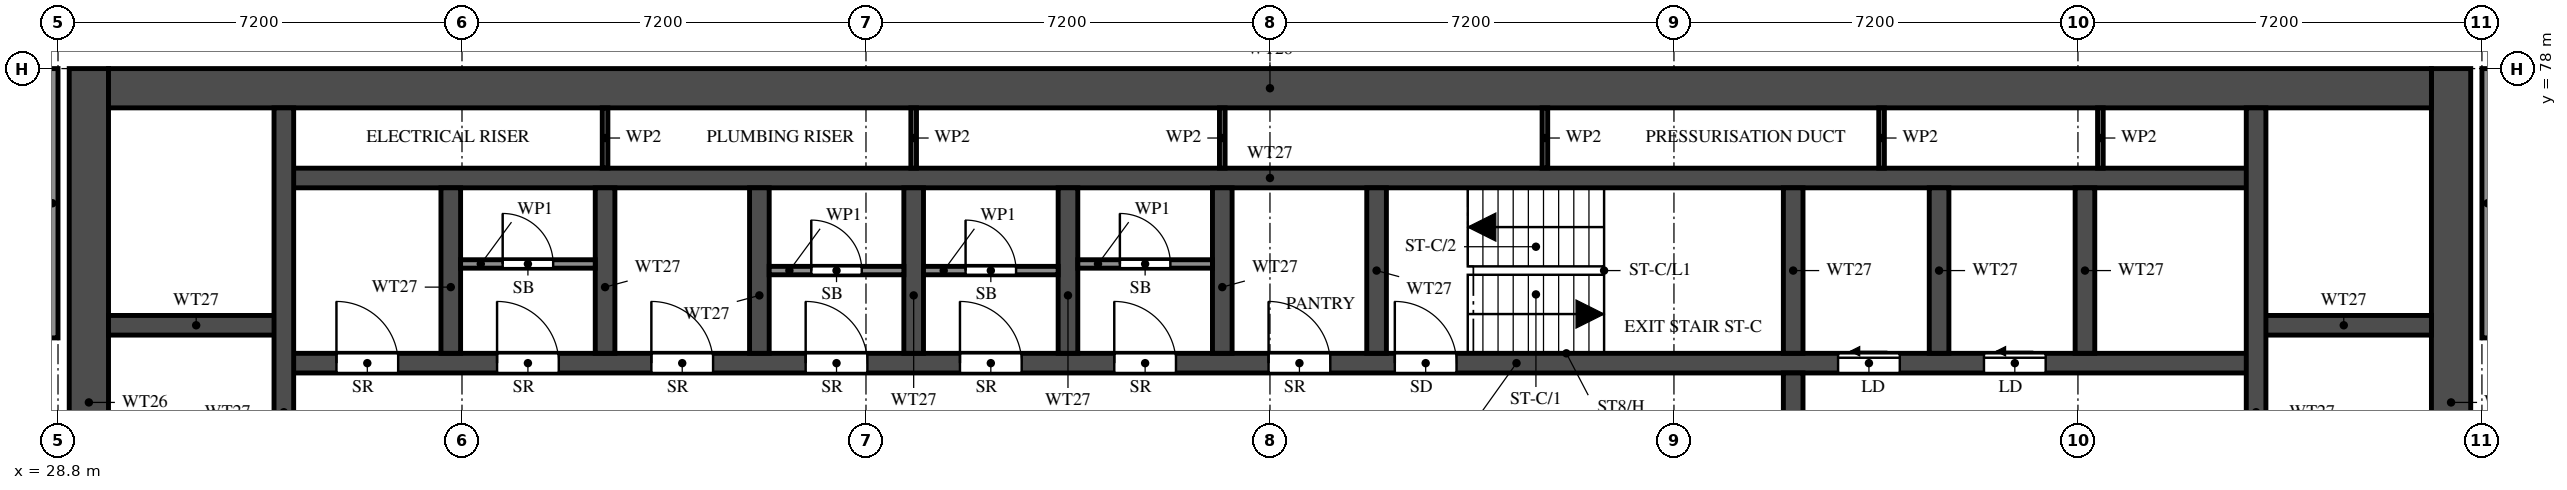
"""IFC4 building model, lengths in metres.
Left out: names, types, materials, properties, quantities, classifications, styles, units other than length and angle.
Written with IfcOpenShell. Run it as: python <this file> out.ifc"""

import sys

from ifc_helpers import new_model, si_unit, direction, frame, frame_2d, origin, place, context, subcontext, project, spatial, rectangle, extrude, element, fill, save


model = new_model("IFC4")
c1 = context("Model", 3, precision=1e-05, world=origin(), true_north=direction((0.0, 1.0)))
c2 = subcontext(c1, "Body", "Model", "MODEL_VIEW")
j1 = project(units=[si_unit("LENGTHUNIT", "METRE"), si_unit("PLANEANGLEUNIT", "RADIAN")], contexts=[c1])
p1 = place(None, origin())
s1 = spatial("IfcSite", under=j1, at=p1, CompositionType="ELEMENT")
p2 = place(p1, origin())
s2 = spatial("IfcBuilding", under=s1, at=p2, CompositionType="ELEMENT")
p3 = place(p2, frame((0.0, 0.0, 116.5)))
s3 = spatial("IfcBuildingStorey", under=s2, at=p3, CompositionType="ELEMENT", Elevation=116.5)
for number, where, z_axis, x_axis in (
    (1, (29.35, 66.1, 0.0), (0.0, 0.0, 1.0), (0.0, 1.0, 0.0)),
    (2, (71.45, 66.1, 0.0), (0.0, 0.0, 1.0), (0.0, 1.0, 0.0)),
):
    element("IfcWall", number, at=place(p3, frame(where, z_axis=z_axis, x_axis=x_axis)), inside=s3, PredefinedType="SHEAR", context=c2, shape_type="SweptSolid", body=[
        extrude(rectangle(XDim=11.9, YDim=0.7, at=frame_2d((5.95, 0.0))), origin(), (0.0, 0.0, 1.0), 3.2),
    ])
p4 = place(p3, frame((29.7, 77.65, 0.0), z_axis=(0.0, 0.0, 1.0), x_axis=(1.0, 0.0, 0.0)))
e3 = element("IfcWall", 3, at=p4, inside=s3, PredefinedType="SHEAR", context=c2, shape_type="SweptSolid", body=[
    extrude(rectangle(XDim=41.4, YDim=0.7, at=frame_2d((20.7, 0.0))), origin(), (0.0, 0.0, 1.0), 3.2),
])
p5 = place(p3, frame((32.825, 72.75, 0.0), z_axis=(0.0, 0.0, 1.0), x_axis=(1.0, 0.0, 0.0)))
e4 = element("IfcWall", 4, at=p5, inside=s3, PredefinedType="SHEAR", context=c2, shape_type="SweptSolid", body=[
    extrude(rectangle(XDim=35.15, YDim=0.35, at=frame_2d((17.575, 0.0))), origin(), (0.0, 0.0, 1.0), 3.2),
])
p6 = place(p5, frame((19.8, 0.0, 0.0)))
e5 = element("IfcOpeningElement", 5, at=p6, cuts=e4, PredefinedType="OPENING", context=c2, shape_type="SweptSolid", body=[
    extrude(rectangle(XDim=1.1, YDim=2.1, at=frame_2d((0.55, 1.05))), frame((0.0, 0.185, 0.0), z_axis=(0.0, -1.0, 0.0), x_axis=(1.0, 0.0, 0.0)), (0.0, 0.0, 1.0), 0.37),
])
p7 = place(p5, frame((27.7, 0.0, 0.0)))
e6 = element("IfcOpeningElement", 6, at=p7, cuts=e4, PredefinedType="OPENING", context=c2, shape_type="SweptSolid", body=[
    extrude(rectangle(XDim=1.1, YDim=2.1, at=frame_2d((0.55, 1.05))), frame((0.0, 0.185, 0.0), z_axis=(0.0, -1.0, 0.0), x_axis=(1.0, 0.0, 0.0)), (0.0, 0.0, 1.0), 0.37),
])
p8 = place(p5, frame((30.3, 0.0, 0.0)))
e7 = element("IfcOpeningElement", 7, at=p8, cuts=e4, PredefinedType="OPENING", context=c2, shape_type="SweptSolid", body=[
    extrude(rectangle(XDim=1.1, YDim=2.1, at=frame_2d((0.55, 1.05))), frame((0.0, 0.185, 0.0), z_axis=(0.0, -1.0, 0.0), x_axis=(1.0, 0.0, 0.0)), (0.0, 0.0, 1.0), 0.37),
])
p9 = place(p5, frame((3.8, 0.0, 0.0)))
e8 = element("IfcOpeningElement", 8, at=p9, cuts=e4, PredefinedType="OPENING", context=c2, shape_type="SweptSolid", body=[
    extrude(rectangle(XDim=1.1, YDim=2.1, at=frame_2d((0.55, 1.05))), frame((0.0, 0.185, 0.0), z_axis=(0.0, -1.0, 0.0), x_axis=(1.0, 0.0, 0.0)), (0.0, 0.0, 1.0), 0.37),
])
p10 = place(p5, frame((6.55, 0.0, 0.0)))
e9 = element("IfcOpeningElement", 9, at=p10, cuts=e4, PredefinedType="OPENING", context=c2, shape_type="SweptSolid", body=[
    extrude(rectangle(XDim=1.1, YDim=2.1, at=frame_2d((0.55, 1.05))), frame((0.0, 0.185, 0.0), z_axis=(0.0, -1.0, 0.0), x_axis=(1.0, 0.0, 0.0)), (0.0, 0.0, 1.0), 0.37),
])
p11 = place(p5, frame((9.3, 0.0, 0.0)))
e10 = element("IfcOpeningElement", 10, at=p11, cuts=e4, PredefinedType="OPENING", context=c2, shape_type="SweptSolid", body=[
    extrude(rectangle(XDim=1.1, YDim=2.1, at=frame_2d((0.55, 1.05))), frame((0.0, 0.185, 0.0), z_axis=(0.0, -1.0, 0.0), x_axis=(1.0, 0.0, 0.0)), (0.0, 0.0, 1.0), 0.37),
])
p12 = place(p5, frame((12.05, 0.0, 0.0)))
e11 = element("IfcOpeningElement", 11, at=p12, cuts=e4, PredefinedType="OPENING", context=c2, shape_type="SweptSolid", body=[
    extrude(rectangle(XDim=1.1, YDim=2.1, at=frame_2d((0.55, 1.05))), frame((0.0, 0.185, 0.0), z_axis=(0.0, -1.0, 0.0), x_axis=(1.0, 0.0, 0.0)), (0.0, 0.0, 1.0), 0.37),
])
p13 = place(p5, frame((14.8, 0.0, 0.0)))
e12 = element("IfcOpeningElement", 12, at=p13, cuts=e4, PredefinedType="OPENING", context=c2, shape_type="SweptSolid", body=[
    extrude(rectangle(XDim=1.1, YDim=2.1, at=frame_2d((0.55, 1.05))), frame((0.0, 0.185, 0.0), z_axis=(0.0, -1.0, 0.0), x_axis=(1.0, 0.0, 0.0)), (0.0, 0.0, 1.0), 0.37),
])
p14 = place(p5, frame((17.55, 0.0, 0.0)))
e13 = element("IfcOpeningElement", 13, at=p14, cuts=e4, PredefinedType="OPENING", context=c2, shape_type="SweptSolid", body=[
    extrude(rectangle(XDim=1.1, YDim=2.1, at=frame_2d((0.55, 1.05))), frame((0.0, 0.185, 0.0), z_axis=(0.0, -1.0, 0.0), x_axis=(1.0, 0.0, 0.0)), (0.0, 0.0, 1.0), 0.37),
])
p15 = place(p5, frame((0.938, 0.0, 0.0)))
e14 = element("IfcOpeningElement", 14, at=p15, cuts=e4, PredefinedType="OPENING", context=c2, shape_type="SweptSolid", body=[
    extrude(rectangle(XDim=1.1, YDim=2.1, at=frame_2d((0.55, 1.05))), frame((0.0, 0.185, 0.0), z_axis=(0.0, -1.0, 0.0), x_axis=(1.0, 0.0, 0.0)), (0.0, 0.0, 1.0), 0.37),
])
p16 = place(p3, frame((32.825, 76.05, 0.0), z_axis=(0.0, 0.0, 1.0), x_axis=(1.0, 0.0, 0.0)))
e15 = element("IfcWall", 15, at=p16, inside=s3, PredefinedType="SHEAR", context=c2, shape_type="SweptSolid", body=[
    extrude(rectangle(XDim=35.15, YDim=0.35, at=frame_2d((17.575, 0.0))), origin(), (0.0, 0.0, 1.0), 3.2),
])
for number, where, z_axis, x_axis in (
    (16, (29.7, 73.425, 0.0), (0.0, 0.0, 1.0), (1.0, 0.0, 0.0)),
    (17, (67.975, 73.425, 0.0), (0.0, 0.0, 1.0), (1.0, 0.0, 0.0)),
):
    element("IfcWall", number, at=place(p3, frame(where, z_axis=z_axis, x_axis=x_axis)), inside=s3, PredefinedType="SHEAR", context=c2, shape_type="SweptSolid", body=[
        extrude(rectangle(XDim=3.125, YDim=0.35, at=frame_2d((1.562, 0.0))), origin(), (0.0, 0.0, 1.0), 3.2),
    ])
p17 = place(p3, frame((32.825, 66.45, 0.0), z_axis=(0.0, 0.0, 1.0), x_axis=(0.0, 1.0, 0.0)))
e18 = element("IfcWall", 18, at=p17, inside=s3, PredefinedType="SHEAR", context=c2, shape_type="SweptSolid", body=[
    extrude(rectangle(XDim=10.85, YDim=0.35, at=frame_2d((5.425, 0.0))), origin(), (0.0, 0.0, 1.0), 3.2),
])
p18 = place(p3, frame((67.975, 66.45, 0.0), z_axis=(0.0, 0.0, 1.0), x_axis=(0.0, 1.0, 0.0)))
e19 = element("IfcWall", 19, at=p18, inside=s3, PredefinedType="SHEAR", context=c2, shape_type="SweptSolid", body=[
    extrude(rectangle(XDim=10.85, YDim=0.35, at=frame_2d((5.425, 0.0))), origin(), (0.0, 0.0, 1.0), 3.2),
])
p19 = place(p18, frame((0.15, 0.0, 0.0)))
e20 = element("IfcOpeningElement", 20, at=p19, cuts=e19, PredefinedType="OPENING", context=c2, shape_type="SweptSolid", body=[
    extrude(rectangle(XDim=1.1, YDim=2.1, at=frame_2d((0.55, 1.05))), frame((0.0, 0.185, 0.0), z_axis=(0.0, -1.0, 0.0), x_axis=(1.0, 0.0, 0.0)), (0.0, 0.0, 1.0), 0.37),
])
p20 = place(p3, frame((59.725, 66.45, 0.0), z_axis=(0.0, 0.0, 1.0), x_axis=(0.0, 1.0, 0.0)))
e21 = element("IfcWall", 21, at=p20, inside=s3, PredefinedType="SHEAR", context=c2, shape_type="SweptSolid", body=[
    extrude(rectangle(XDim=6.125, YDim=0.35, at=frame_2d((3.062, 0.0))), origin(), (0.0, 0.0, 1.0), 3.2),
])
p21 = place(p20, frame((3.85, 0.0, 0.0)))
e22 = element("IfcOpeningElement", 22, at=p21, cuts=e21, PredefinedType="OPENING", context=c2, shape_type="SweptSolid", body=[
    extrude(rectangle(XDim=1.2, YDim=2.1, at=frame_2d((0.6, 1.05))), frame((0.0, 0.185, 0.0), z_axis=(0.0, -1.0, 0.0), x_axis=(1.0, 0.0, 0.0)), (0.0, 0.0, 1.0), 0.37),
])
for number, where, z_axis, x_axis in (
    (23, (59.725, 72.925, 0.0), (0.0, 0.0, 1.0), (0.0, 1.0, 0.0)),
    (24, (35.8, 72.925, 0.0), (0.0, 0.0, 1.0), (0.0, 1.0, 0.0)),
    (25, (38.55, 72.925, 0.0), (0.0, 0.0, 1.0), (0.0, 1.0, 0.0)),
    (26, (41.3, 72.925, 0.0), (0.0, 0.0, 1.0), (0.0, 1.0, 0.0)),
    (27, (44.05, 72.925, 0.0), (0.0, 0.0, 1.0), (0.0, 1.0, 0.0)),
    (28, (46.8, 72.925, 0.0), (0.0, 0.0, 1.0), (0.0, 1.0, 0.0)),
    (29, (49.55, 72.925, 0.0), (0.0, 0.0, 1.0), (0.0, 1.0, 0.0)),
    (30, (52.3, 72.925, 0.0), (0.0, 0.0, 1.0), (0.0, 1.0, 0.0)),
    (31, (62.325, 72.925, 0.0), (0.0, 0.0, 1.0), (0.0, 1.0, 0.0)),
    (32, (64.925, 72.925, 0.0), (0.0, 0.0, 1.0), (0.0, 1.0, 0.0)),
):
    element("IfcWall", number, at=place(p3, frame(where, z_axis=z_axis, x_axis=x_axis)), inside=s3, PredefinedType="SHEAR", context=c2, shape_type="SweptSolid", body=[
        extrude(rectangle(XDim=2.95, YDim=0.35, at=frame_2d((1.475, 0.0))), origin(), (0.0, 0.0, 1.0), 3.2),
    ])
p22 = place(p3, frame((35.975, 74.518, 0.0), z_axis=(0.0, 0.0, 1.0), x_axis=(1.0, 0.0, 0.0)))
e33 = element("IfcWall", 33, at=p22, inside=s3, PredefinedType="PARTITIONING", context=c2, shape_type="SweptSolid", body=[
    extrude(rectangle(XDim=2.4, YDim=0.15, at=frame_2d((1.2, 0.0))), origin(), (0.0, 0.0, 1.0), 3.2),
])
p23 = place(p22, frame((0.75, 0.0, 0.0)))
e34 = element("IfcOpeningElement", 34, at=p23, cuts=e33, PredefinedType="OPENING", context=c2, shape_type="SweptSolid", body=[
    extrude(rectangle(XDim=0.9, YDim=2.1, at=frame_2d((0.45, 1.05))), frame((0.0, 0.085, 0.0), z_axis=(0.0, -1.0, 0.0), x_axis=(1.0, 0.0, 0.0)), (0.0, 0.0, 1.0), 0.17),
])
p24 = place(p3, frame((41.475, 74.4, 0.0), z_axis=(0.0, 0.0, 1.0), x_axis=(1.0, 0.0, 0.0)))
e35 = element("IfcWall", 35, at=p24, inside=s3, PredefinedType="PARTITIONING", context=c2, shape_type="SweptSolid", body=[
    extrude(rectangle(XDim=2.4, YDim=0.15, at=frame_2d((1.2, 0.0))), origin(), (0.0, 0.0, 1.0), 3.2),
])
p25 = place(p24, frame((0.75, 0.0, 0.0)))
e36 = element("IfcOpeningElement", 36, at=p25, cuts=e35, PredefinedType="OPENING", context=c2, shape_type="SweptSolid", body=[
    extrude(rectangle(XDim=0.9, YDim=2.1, at=frame_2d((0.45, 1.05))), frame((0.0, 0.085, 0.0), z_axis=(0.0, -1.0, 0.0), x_axis=(1.0, 0.0, 0.0)), (0.0, 0.0, 1.0), 0.17),
])
p26 = place(p3, frame((44.225, 74.4, 0.0), z_axis=(0.0, 0.0, 1.0), x_axis=(1.0, 0.0, 0.0)))
e37 = element("IfcWall", 37, at=p26, inside=s3, PredefinedType="PARTITIONING", context=c2, shape_type="SweptSolid", body=[
    extrude(rectangle(XDim=2.4, YDim=0.15, at=frame_2d((1.2, 0.0))), origin(), (0.0, 0.0, 1.0), 3.2),
])
p27 = place(p26, frame((0.75, 0.0, 0.0)))
e38 = element("IfcOpeningElement", 38, at=p27, cuts=e37, PredefinedType="OPENING", context=c2, shape_type="SweptSolid", body=[
    extrude(rectangle(XDim=0.9, YDim=2.1, at=frame_2d((0.45, 1.05))), frame((0.0, 0.085, 0.0), z_axis=(0.0, -1.0, 0.0), x_axis=(1.0, 0.0, 0.0)), (0.0, 0.0, 1.0), 0.17),
])
p28 = place(p3, frame((46.975, 74.518, 0.0), z_axis=(0.0, 0.0, 1.0), x_axis=(1.0, 0.0, 0.0)))
e39 = element("IfcWall", 39, at=p28, inside=s3, PredefinedType="PARTITIONING", context=c2, shape_type="SweptSolid", body=[
    extrude(rectangle(XDim=2.4, YDim=0.15, at=frame_2d((1.2, 0.0))), origin(), (0.0, 0.0, 1.0), 3.2),
])
p29 = place(p28, frame((0.75, 0.0, 0.0)))
e40 = element("IfcOpeningElement", 40, at=p29, cuts=e39, PredefinedType="OPENING", context=c2, shape_type="SweptSolid", body=[
    extrude(rectangle(XDim=0.9, YDim=2.1, at=frame_2d((0.45, 1.05))), frame((0.0, 0.085, 0.0), z_axis=(0.0, -1.0, 0.0), x_axis=(1.0, 0.0, 0.0)), (0.0, 0.0, 1.0), 0.17),
])
for number, where, z_axis, x_axis in (
    (41, (38.55, 76.225, 0.0), (0.0, 0.0, 1.0), (0.0, 1.0, 0.0)),
    (42, (44.05, 76.225, 0.0), (0.0, 0.0, 1.0), (0.0, 1.0, 0.0)),
    (43, (49.55, 76.225, 0.0), (0.0, 0.0, 1.0), (0.0, 1.0, 0.0)),
    (44, (55.3, 76.225, 0.0), (0.0, 0.0, 1.0), (0.0, 1.0, 0.0)),
    (45, (61.3, 76.225, 0.0), (0.0, 0.0, 1.0), (0.0, 1.0, 0.0)),
    (46, (65.2, 76.225, 0.0), (0.0, 0.0, 1.0), (0.0, 1.0, 0.0)),
):
    element("IfcWall", number, at=place(p3, frame(where, z_axis=z_axis, x_axis=x_axis)), inside=s3, PredefinedType="PARTITIONING", context=c2, shape_type="SweptSolid", body=[
        extrude(rectangle(XDim=1.075, YDim=0.1, at=frame_2d((0.538, 0.0))), origin(), (0.0, 0.0, 1.0), 3.2),
    ])
for number, where, z_axis, x_axis in (
    (47, (28.7, 73.2, 0.0), (0.0, 0.0, 1.0), (0.0, 1.0, 0.0)),
    (48, (72.1, 73.2, 0.0), (0.0, 0.0, 1.0), (0.0, 1.0, 0.0)),
):
    element("IfcWall", number, at=place(p3, frame(where, z_axis=z_axis, x_axis=x_axis)), inside=s3, PredefinedType="SOLIDWALL", context=c2, shape_type="SweptSolid", body=[
        extrude(rectangle(XDim=4.8, YDim=0.2, at=frame_2d((2.4, 0.0))), origin(), (0.0, 0.0, 1.0), 3.2),
    ])
p30 = place(p6, origin())
e49 = element("IfcDoor", 49, at=p30, inside=s3, OperationType="SINGLE_SWING_LEFT", PredefinedType="DOOR", context=c2, shape_type="SweptSolid", body=[
    extrude(rectangle(XDim=1.1, YDim=2.1, at=frame_2d((0.55, 1.05))), frame((0.0, 0.025, 0.0), z_axis=(0.0, -1.0, 0.0), x_axis=(1.0, 0.0, 0.0)), (0.0, 0.0, 1.0), 0.05),
])
fill(e5, e49)
p31 = place(p7, origin())
e50 = element("IfcDoor", 50, at=p31, inside=s3, OperationType="SLIDING_TO_LEFT", PredefinedType="DOOR", context=c2, shape_type="SweptSolid", body=[
    extrude(rectangle(XDim=1.1, YDim=2.1, at=frame_2d((0.55, 1.05))), frame((0.0, 0.025, 0.0), z_axis=(0.0, -1.0, 0.0), x_axis=(1.0, 0.0, 0.0)), (0.0, 0.0, 1.0), 0.05),
])
fill(e6, e50)
p32 = place(p8, origin())
e51 = element("IfcDoor", 51, at=p32, inside=s3, OperationType="SLIDING_TO_LEFT", PredefinedType="DOOR", context=c2, shape_type="SweptSolid", body=[
    extrude(rectangle(XDim=1.1, YDim=2.1, at=frame_2d((0.55, 1.05))), frame((0.0, 0.025, 0.0), z_axis=(0.0, -1.0, 0.0), x_axis=(1.0, 0.0, 0.0)), (0.0, 0.0, 1.0), 0.05),
])
fill(e7, e51)
p33 = place(p9, origin())
e52 = element("IfcDoor", 52, at=p33, inside=s3, OperationType="SINGLE_SWING_LEFT", PredefinedType="DOOR", context=c2, shape_type="SweptSolid", body=[
    extrude(rectangle(XDim=1.1, YDim=2.1, at=frame_2d((0.55, 1.05))), frame((0.0, 0.025, 0.0), z_axis=(0.0, -1.0, 0.0), x_axis=(1.0, 0.0, 0.0)), (0.0, 0.0, 1.0), 0.05),
])
fill(e8, e52)
p34 = place(p23, origin())
e53 = element("IfcDoor", 53, at=p34, inside=s3, OperationType="SINGLE_SWING_RIGHT", PredefinedType="DOOR", context=c2, shape_type="SweptSolid", body=[
    extrude(rectangle(XDim=0.9, YDim=2.1, at=frame_2d((0.45, 1.05))), frame((0.0, 0.025, 0.0), z_axis=(0.0, -1.0, 0.0), x_axis=(1.0, 0.0, 0.0)), (0.0, 0.0, 1.0), 0.05),
])
fill(e34, e53)
p35 = place(p10, origin())
e54 = element("IfcDoor", 54, at=p35, inside=s3, OperationType="SINGLE_SWING_RIGHT", PredefinedType="DOOR", context=c2, shape_type="SweptSolid", body=[
    extrude(rectangle(XDim=1.1, YDim=2.1, at=frame_2d((0.55, 1.05))), frame((0.0, 0.025, 0.0), z_axis=(0.0, -1.0, 0.0), x_axis=(1.0, 0.0, 0.0)), (0.0, 0.0, 1.0), 0.05),
])
fill(e9, e54)
p36 = place(p11, origin())
e55 = element("IfcDoor", 55, at=p36, inside=s3, OperationType="SINGLE_SWING_LEFT", PredefinedType="DOOR", context=c2, shape_type="SweptSolid", body=[
    extrude(rectangle(XDim=1.1, YDim=2.1, at=frame_2d((0.55, 1.05))), frame((0.0, 0.025, 0.0), z_axis=(0.0, -1.0, 0.0), x_axis=(1.0, 0.0, 0.0)), (0.0, 0.0, 1.0), 0.05),
])
fill(e10, e55)
p37 = place(p25, origin())
e56 = element("IfcDoor", 56, at=p37, inside=s3, OperationType="SINGLE_SWING_LEFT", PredefinedType="DOOR", context=c2, shape_type="SweptSolid", body=[
    extrude(rectangle(XDim=0.9, YDim=2.1, at=frame_2d((0.45, 1.05))), frame((0.0, 0.025, 0.0), z_axis=(0.0, -1.0, 0.0), x_axis=(1.0, 0.0, 0.0)), (0.0, 0.0, 1.0), 0.05),
])
fill(e36, e56)
p38 = place(p12, origin())
e57 = element("IfcDoor", 57, at=p38, inside=s3, OperationType="SINGLE_SWING_RIGHT", PredefinedType="DOOR", context=c2, shape_type="SweptSolid", body=[
    extrude(rectangle(XDim=1.1, YDim=2.1, at=frame_2d((0.55, 1.05))), frame((0.0, 0.025, 0.0), z_axis=(0.0, -1.0, 0.0), x_axis=(1.0, 0.0, 0.0)), (0.0, 0.0, 1.0), 0.05),
])
fill(e11, e57)
p39 = place(p27, origin())
e58 = element("IfcDoor", 58, at=p39, inside=s3, OperationType="SINGLE_SWING_RIGHT", PredefinedType="DOOR", context=c2, shape_type="SweptSolid", body=[
    extrude(rectangle(XDim=0.9, YDim=2.1, at=frame_2d((0.45, 1.05))), frame((0.0, 0.025, 0.0), z_axis=(0.0, -1.0, 0.0), x_axis=(1.0, 0.0, 0.0)), (0.0, 0.0, 1.0), 0.05),
])
fill(e38, e58)
p40 = place(p13, origin())
e59 = element("IfcDoor", 59, at=p40, inside=s3, OperationType="SINGLE_SWING_LEFT", PredefinedType="DOOR", context=c2, shape_type="SweptSolid", body=[
    extrude(rectangle(XDim=1.1, YDim=2.1, at=frame_2d((0.55, 1.05))), frame((0.0, 0.025, 0.0), z_axis=(0.0, -1.0, 0.0), x_axis=(1.0, 0.0, 0.0)), (0.0, 0.0, 1.0), 0.05),
])
fill(e12, e59)
p41 = place(p29, origin())
e60 = element("IfcDoor", 60, at=p41, inside=s3, OperationType="SINGLE_SWING_RIGHT", PredefinedType="DOOR", context=c2, shape_type="SweptSolid", body=[
    extrude(rectangle(XDim=0.9, YDim=2.1, at=frame_2d((0.45, 1.05))), frame((0.0, 0.025, 0.0), z_axis=(0.0, -1.0, 0.0), x_axis=(1.0, 0.0, 0.0)), (0.0, 0.0, 1.0), 0.05),
])
fill(e40, e60)
p42 = place(p14, origin())
e61 = element("IfcDoor", 61, at=p42, inside=s3, OperationType="SINGLE_SWING_RIGHT", PredefinedType="DOOR", context=c2, shape_type="SweptSolid", body=[
    extrude(rectangle(XDim=1.1, YDim=2.1, at=frame_2d((0.55, 1.05))), frame((0.0, 0.025, 0.0), z_axis=(0.0, -1.0, 0.0), x_axis=(1.0, 0.0, 0.0)), (0.0, 0.0, 1.0), 0.05),
])
fill(e13, e61)
p43 = place(p15, origin())
e62 = element("IfcDoor", 62, at=p43, inside=s3, OperationType="SINGLE_SWING_LEFT", PredefinedType="DOOR", context=c2, shape_type="SweptSolid", body=[
    extrude(rectangle(XDim=1.1, YDim=2.1, at=frame_2d((0.55, 1.05))), frame((0.0, 0.025, 0.0), z_axis=(0.0, -1.0, 0.0), x_axis=(1.0, 0.0, 0.0)), (0.0, 0.0, 1.0), 0.05),
])
fill(e14, e62)
save(model, sys.argv[1])
